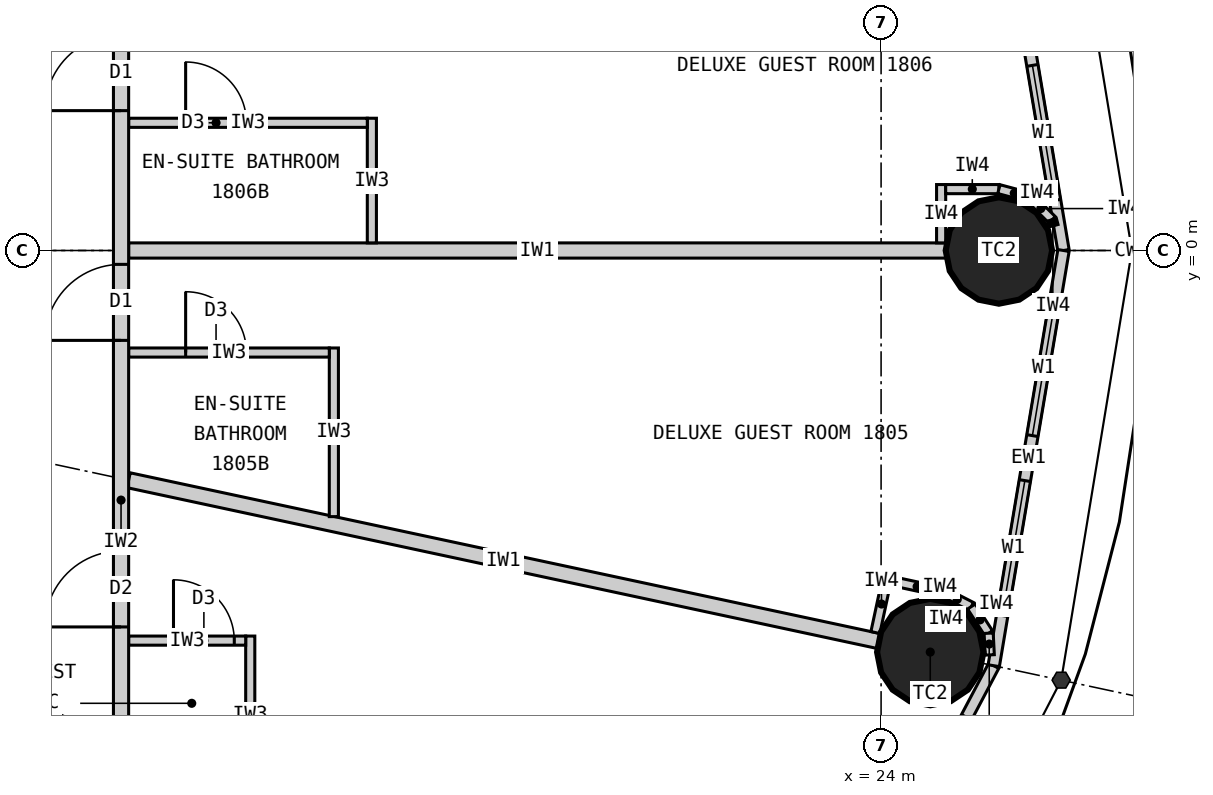
"""IFC4 building model, lengths in metres.
Left out: names, types, materials, properties, quantities, classifications, styles, units other than length and angle.
Written with IfcOpenShell. Run it as: python <this file> out.ifc"""

import sys

from ifc_helpers import new_model, si_unit, direction, frame, frame_2d, origin, origin_2d, place, context, subcontext, project, spatial, rectangle, circle, extrude, element, fill, save


model = new_model("IFC4")
c1 = context("Model", 3, precision=1e-05, world=origin(), true_north=direction((0.0, 1.0)))
c2 = subcontext(c1, "Body", "Model", "MODEL_VIEW")
j1 = project(units=[si_unit("LENGTHUNIT", "METRE"), si_unit("PLANEANGLEUNIT", "RADIAN")], contexts=[c1])
p1 = place(None, origin())
s1 = spatial("IfcSite", under=j1, at=p1, CompositionType="ELEMENT")
p2 = place(p1, origin())
s2 = spatial("IfcBuilding", under=s1, at=p2, CompositionType="ELEMENT")
p3 = place(p2, frame((0.0, 0.0, 73.8)))
s3 = spatial("IfcBuildingStorey", under=s2, at=p3, CompositionType="ELEMENT", Elevation=73.8)
for number, where, z_axis, x_axis in (
    (1, (25.55, 0.0, 0.0), (0.0, 0.0, 1.0), (1.0, 0.0, 0.0)),
    (2, (24.647, -5.283, 0.0), (0.0, 0.0, 1.0), (1.0, 0.0, 0.0)),
):
    element("IfcColumn", number, at=place(p3, frame(where, z_axis=z_axis, x_axis=x_axis)), inside=s3, PredefinedType="COLUMN", context=c2, shape_type="SweptSolid", body=[
        extrude(circle(Radius=0.7, at=origin_2d()), origin(), (0.0, 0.0, 1.0), 3.3),
    ])
p4 = place(p3, frame((26.4, 0.0, 0.0), z_axis=(0.0, 0.0, 1.0), x_axis=(-0.165642551694, 0.986185857264, 0.0)))
e3 = element("IfcWall", 3, at=p4, inside=s3, PredefinedType="ELEMENTEDWALL", context=c2, shape_type="SweptSolid", body=[
    extrude(rectangle(XDim=5.539, YDim=0.15, at=frame_2d((2.77, 0.0))), origin(), (0.0, 0.0, 1.0), 3.12),
])
p5 = place(p4, frame((0.669, 0.0, 0.9)))
e4 = element("IfcOpeningElement", 4, at=p5, cuts=e3, PredefinedType="OPENING", context=c2, shape_type="SweptSolid", body=[
    extrude(rectangle(XDim=1.8, YDim=1.9, at=frame_2d((0.9, 0.95))), frame((0.0, 0.085, 0.0), z_axis=(0.0, -1.0, 0.0), x_axis=(1.0, 0.0, 0.0)), (0.0, 0.0, 1.0), 0.17),
])
p6 = place(p4, frame((3.07, 0.0, 0.9)))
e5 = element("IfcOpeningElement", 5, at=p6, cuts=e3, PredefinedType="OPENING", context=c2, shape_type="SweptSolid", body=[
    extrude(rectangle(XDim=1.8, YDim=1.9, at=frame_2d((0.9, 0.95))), frame((0.0, 0.085, 0.0), z_axis=(0.0, -1.0, 0.0), x_axis=(1.0, 0.0, 0.0)), (0.0, 0.0, 1.0), 0.17),
])
p7 = place(p3, frame((22.803, -10.532, 0.0), z_axis=(0.0, 0.0, 1.0), x_axis=(0.467296867008, 0.884100468321, 0.0)))
e6 = element("IfcWall", 6, at=p7, inside=s3, PredefinedType="ELEMENTEDWALL", context=c2, shape_type="SweptSolid", body=[
    extrude(rectangle(XDim=5.734, YDim=0.15, at=frame_2d((2.867, 0.0))), origin(), (0.0, 0.0, 1.0), 3.12),
])
p8 = place(p7, frame((0.767, 0.0, 0.9)))
e7 = element("IfcOpeningElement", 7, at=p8, cuts=e6, PredefinedType="OPENING", context=c2, shape_type="SweptSolid", body=[
    extrude(rectangle(XDim=1.8, YDim=1.9, at=frame_2d((0.9, 0.95))), frame((0.0, 0.085, 0.0), z_axis=(0.0, -1.0, 0.0), x_axis=(1.0, 0.0, 0.0)), (0.0, 0.0, 1.0), 0.17),
])
p9 = place(p7, frame((3.167, 0.0, 0.9)))
e8 = element("IfcOpeningElement", 8, at=p9, cuts=e6, PredefinedType="OPENING", context=c2, shape_type="SweptSolid", body=[
    extrude(rectangle(XDim=1.8, YDim=1.9, at=frame_2d((0.9, 0.95))), frame((0.0, 0.085, 0.0), z_axis=(0.0, -1.0, 0.0), x_axis=(1.0, 0.0, 0.0)), (0.0, 0.0, 1.0), 0.17),
])
p10 = place(p3, frame((25.482, -5.462, 0.0), z_axis=(0.0, 0.0, 1.0), x_axis=(0.165642551694, 0.986185857264, 0.0)))
e9 = element("IfcWall", 9, at=p10, inside=s3, PredefinedType="ELEMENTEDWALL", context=c2, shape_type="SweptSolid", body=[
    extrude(rectangle(XDim=5.539, YDim=0.15, at=frame_2d((2.77, 0.0))), origin(), (0.0, 0.0, 1.0), 3.12),
])
p11 = place(p10, frame((0.669, 0.0, 0.9)))
e10 = element("IfcOpeningElement", 10, at=p11, cuts=e9, PredefinedType="OPENING", context=c2, shape_type="SweptSolid", body=[
    extrude(rectangle(XDim=1.8, YDim=1.9, at=frame_2d((0.9, 0.95))), frame((0.0, 0.085, 0.0), z_axis=(0.0, -1.0, 0.0), x_axis=(1.0, 0.0, 0.0)), (0.0, 0.0, 1.0), 0.17),
])
p12 = place(p10, frame((3.07, 0.0, 0.9)))
e11 = element("IfcOpeningElement", 11, at=p12, cuts=e9, PredefinedType="OPENING", context=c2, shape_type="SweptSolid", body=[
    extrude(rectangle(XDim=1.8, YDim=1.9, at=frame_2d((0.9, 0.95))), frame((0.0, 0.085, 0.0), z_axis=(0.0, -1.0, 0.0), x_axis=(1.0, 0.0, 0.0)), (0.0, 0.0, 1.0), 0.17),
])
p13 = place(p3, frame((14.1, 0.0, 0.0), z_axis=(0.0, 0.0, 1.0), x_axis=(1.0, 0.0, 0.0)))
e12 = element("IfcWall", 12, at=p13, inside=s3, PredefinedType="PARTITIONING", context=c2, shape_type="SweptSolid", body=[
    extrude(rectangle(XDim=10.75, YDim=0.2, at=frame_2d((5.375, 0.0))), origin(), (0.0, 0.0, 1.0), 2.27),
])
p14 = place(p3, frame((14.1, -3.022, 0.0), z_axis=(0.0, 0.0, 1.0), x_axis=(0.977790014929, -0.209586943072, 0.0)))
e13 = element("IfcWall", 13, at=p14, inside=s3, PredefinedType="PARTITIONING", context=c2, shape_type="SweptSolid", body=[
    extrude(rectangle(XDim=10.087, YDim=0.2, at=frame_2d((5.043, 0.0))), origin(), (0.0, 0.0, 1.0), 2.32),
])
p15 = place(p3, frame((15.7, -7.152, 0.0), z_axis=(0.0, 0.0, 1.0), x_axis=(0.0, 1.0, 0.0)))
e14 = element("IfcWall", 14, at=p15, inside=s3, PredefinedType="PARTITIONING", context=c2, shape_type="SweptSolid", body=[
    extrude(rectangle(XDim=2.079, YDim=0.12, at=frame_2d((1.04, 0.0))), origin(), (0.0, 0.0, 1.0), 3.12),
])
p16 = place(p3, frame((14.1, -5.133, 0.0), z_axis=(0.0, 0.0, 1.0), x_axis=(1.0, 0.0, 0.0)))
e15 = element("IfcWall", 15, at=p16, inside=s3, PredefinedType="PARTITIONING", context=c2, shape_type="SweptSolid", body=[
    extrude(rectangle(XDim=1.54, YDim=0.12, at=frame_2d((0.77, 0.0))), origin(), (0.0, 0.0, 1.0), 3.12),
])
p17 = place(p16, frame((0.59, 0.0, 0.0)))
e16 = element("IfcOpeningElement", 16, at=p17, cuts=e15, PredefinedType="OPENING", context=c2, shape_type="SweptSolid", body=[
    extrude(rectangle(XDim=0.8, YDim=2.1, at=frame_2d((0.4, 1.05))), frame((0.0, 0.07, 0.0), z_axis=(0.0, -1.0, 0.0), x_axis=(1.0, 0.0, 0.0)), (0.0, 0.0, 1.0), 0.14),
])
p18 = place(p3, frame((16.8, -3.501, 0.0), z_axis=(0.0, 0.0, 1.0), x_axis=(0.0, 1.0, 0.0)))
e17 = element("IfcWall", 17, at=p18, inside=s3, PredefinedType="PARTITIONING", context=c2, shape_type="SweptSolid", body=[
    extrude(rectangle(XDim=2.219, YDim=0.12, at=frame_2d((1.109, 0.0))), origin(), (0.0, 0.0, 1.0), 3.12),
])
p19 = place(p3, frame((14.1, -1.343, 0.0), z_axis=(0.0, 0.0, 1.0), x_axis=(1.0, 0.0, 0.0)))
e18 = element("IfcWall", 18, at=p19, inside=s3, PredefinedType="PARTITIONING", context=c2, shape_type="SweptSolid", body=[
    extrude(rectangle(XDim=2.64, YDim=0.12, at=frame_2d((1.32, 0.0))), origin(), (0.0, 0.0, 1.0), 3.12),
])
p20 = place(p19, frame((0.75, 0.0, 0.0)))
e19 = element("IfcOpeningElement", 19, at=p20, cuts=e18, PredefinedType="OPENING", context=c2, shape_type="SweptSolid", body=[
    extrude(rectangle(XDim=0.8, YDim=2.1, at=frame_2d((0.4, 1.05))), frame((0.0, 0.07, 0.0), z_axis=(0.0, -1.0, 0.0), x_axis=(1.0, 0.0, 0.0)), (0.0, 0.0, 1.0), 0.14),
])
p21 = place(p3, frame((17.3, 0.1, 0.0), z_axis=(0.0, 0.0, 1.0), x_axis=(0.0, 1.0, 0.0)))
e20 = element("IfcWall", 20, at=p21, inside=s3, PredefinedType="PARTITIONING", context=c2, shape_type="SweptSolid", body=[
    extrude(rectangle(XDim=1.64, YDim=0.12, at=frame_2d((0.82, 0.0))), origin(), (0.0, 0.0, 1.0), 3.12),
])
p22 = place(p3, frame((14.1, 1.68, 0.0), z_axis=(0.0, 0.0, 1.0), x_axis=(1.0, 0.0, 0.0)))
e21 = element("IfcWall", 21, at=p22, inside=s3, PredefinedType="PARTITIONING", context=c2, shape_type="SweptSolid", body=[
    extrude(rectangle(XDim=3.14, YDim=0.12, at=frame_2d((1.57, 0.0))), origin(), (0.0, 0.0, 1.0), 3.12),
])
p23 = place(p22, frame((0.75, 0.0, 0.0)))
e22 = element("IfcOpeningElement", 22, at=p23, cuts=e21, PredefinedType="OPENING", context=c2, shape_type="SweptSolid", body=[
    extrude(rectangle(XDim=0.8, YDim=2.1, at=frame_2d((0.4, 1.05))), frame((0.0, 0.07, 0.0), z_axis=(0.0, -1.0, 0.0), x_axis=(1.0, 0.0, 0.0)), (0.0, 0.0, 1.0), 0.14),
])
p24 = place(p3, frame((14.0, -9.9, 0.0), z_axis=(0.0, 0.0, 1.0), x_axis=(0.0, 1.0, 0.0)))
e23 = element("IfcWall", 23, at=p24, inside=s3, PredefinedType="PARTITIONING", context=c2, shape_type="SweptSolid", body=[
    extrude(rectangle(XDim=13.232, YDim=0.2, at=frame_2d((6.616, 0.0))), origin(), (0.0, 0.0, 1.0), 3.12),
])
p25 = place(p24, frame((4.948, 0.0, 0.0)))
e24 = element("IfcOpeningElement", 24, at=p25, cuts=e23, PredefinedType="OPENING", context=c2, shape_type="SweptSolid", body=[
    extrude(rectangle(XDim=1.0, YDim=2.2, at=frame_2d((0.5, 1.1))), frame((0.0, 0.11, 0.0), z_axis=(0.0, -1.0, 0.0), x_axis=(1.0, 0.0, 0.0)), (0.0, 0.0, 1.0), 0.22),
])
p26 = place(p24, frame((8.718, 0.0, 0.0)))
e25 = element("IfcOpeningElement", 25, at=p26, cuts=e23, PredefinedType="OPENING", context=c2, shape_type="SweptSolid", body=[
    extrude(rectangle(XDim=1.0, YDim=2.2, at=frame_2d((0.5, 1.1))), frame((0.0, 0.11, 0.0), z_axis=(0.0, -1.0, 0.0), x_axis=(1.0, 0.0, 0.0)), (0.0, 0.0, 1.0), 0.22),
])
p27 = place(p24, frame((11.74, 0.0, 0.0)))
e26 = element("IfcOpeningElement", 26, at=p27, cuts=e23, PredefinedType="OPENING", context=c2, shape_type="SweptSolid", body=[
    extrude(rectangle(XDim=1.0, YDim=2.2, at=frame_2d((0.5, 1.1))), frame((0.0, 0.11, 0.0), z_axis=(0.0, -1.0, 0.0), x_axis=(1.0, 0.0, 0.0)), (0.0, 0.0, 1.0), 0.22),
])
p28 = place(p3, frame((24.79, 0.1, 0.0), z_axis=(0.0, 0.0, 1.0), x_axis=(0.0, 1.0, 0.0)))
e27 = element("IfcWall", 27, at=p28, inside=s3, PredefinedType="PARTITIONING", context=c2, shape_type="SweptSolid", body=[
    extrude(rectangle(XDim=0.767, YDim=0.12, at=frame_2d((0.384, 0.0))), origin(), (0.0, 0.0, 1.0), 3.12),
])
p29 = place(p3, frame((24.85, 0.808, 0.0), z_axis=(0.0, 0.0, 1.0), x_axis=(1.0, 0.0, 0.0)))
e28 = element("IfcWall", 28, at=p29, inside=s3, PredefinedType="PARTITIONING", context=c2, shape_type="SweptSolid", body=[
    extrude(rectangle(XDim=0.7, YDim=0.12, at=frame_2d((0.35, 0.0))), origin(), (0.0, 0.0, 1.0), 3.12),
])
p30 = place(p3, frame((25.55, 0.808, 0.0), z_axis=(0.0, 0.0, 1.0), x_axis=(0.965807183573, -0.2592614205, 0.0)))
e29 = element("IfcWall", 29, at=p30, inside=s3, PredefinedType="PARTITIONING", context=c2, shape_type="SweptSolid", body=[
    extrude(rectangle(XDim=0.418, YDim=0.12, at=frame_2d((0.209, 0.0))), origin(), (0.0, 0.0, 1.0), 3.12),
])
p31 = place(p3, frame((25.954, 0.699, 0.0), z_axis=(0.0, 0.0, 1.0), x_axis=(0.707106781187, -0.707106781187, 0.0)))
e30 = element("IfcWall", 30, at=p31, inside=s3, PredefinedType="PARTITIONING", context=c2, shape_type="SweptSolid", body=[
    extrude(rectangle(XDim=0.418, YDim=0.12, at=frame_2d((0.209, 0.0))), origin(), (0.0, 0.0, 1.0), 3.12),
])
p32 = place(p3, frame((26.249, 0.404, 0.0), z_axis=(0.0, 0.0, 1.0), x_axis=(0.259754282609, -0.965674744759, 0.0)))
e31 = element("IfcWall", 31, at=p32, inside=s3, PredefinedType="PARTITIONING", context=c2, shape_type="SweptSolid", body=[
    extrude(rectangle(XDim=0.08, YDim=0.12, at=frame_2d((0.04, 0.0))), origin(), (0.0, 0.0, 1.0), 3.12),
])
p33 = place(p3, frame((23.925, -5.026, 0.0), z_axis=(0.0, 0.0, 1.0), x_axis=(0.209681192172, 0.977769808109, 0.0)))
e32 = element("IfcWall", 32, at=p33, inside=s3, PredefinedType="PARTITIONING", context=c2, shape_type="SweptSolid", body=[
    extrude(rectangle(XDim=0.767, YDim=0.12, at=frame_2d((0.384, 0.0))), origin(), (0.0, 0.0, 1.0), 3.12),
])
p34 = place(p3, frame((24.132, -4.347, 0.0), z_axis=(0.0, 0.0, 1.0), x_axis=(0.977776882509, -0.209648200638, 0.0)))
e33 = element("IfcWall", 33, at=p34, inside=s3, PredefinedType="PARTITIONING", context=c2, shape_type="SweptSolid", body=[
    extrude(rectangle(XDim=0.7, YDim=0.12, at=frame_2d((0.35, 0.0))), origin(), (0.0, 0.0, 1.0), 3.12),
])
for number, where, z_axis, x_axis in (
    (34, (24.816, -4.494, 0.0), (0.0, 0.0, 1.0), (0.89, -0.455, 0.0)),
    (35, (25.188, -4.684, 0.0), (0.0, 0.0, 1.0), (0.543, -0.84, 0.0)),
):
    element("IfcWall", number, at=place(p3, frame(where, z_axis=z_axis, x_axis=x_axis)), inside=s3, PredefinedType="PARTITIONING", context=c2, shape_type="SweptSolid", body=[
        extrude(rectangle(XDim=0.418, YDim=0.12, at=frame_2d((0.209, 0.0))), origin(), (0.0, 0.0, 1.0), 3.12),
    ])
p35 = place(p3, frame((25.416, -5.035, 0.0), z_axis=(0.0, 0.0, 1.0), x_axis=(0.050406329159, -0.998728793007, 0.0)))
e36 = element("IfcWall", 36, at=p35, inside=s3, PredefinedType="PARTITIONING", context=c2, shape_type="SweptSolid", body=[
    extrude(rectangle(XDim=0.286, YDim=0.12, at=frame_2d((0.143, 0.0))), origin(), (0.0, 0.0, 1.0), 3.12),
])
p36 = place(p5, origin())
e37 = element("IfcWindow", 37, at=p36, inside=s3, PartitioningType="SINGLE_PANEL", PredefinedType="WINDOW", context=c2, shape_type="SweptSolid", body=[
    extrude(rectangle(XDim=1.8, YDim=1.9, at=frame_2d((0.9, 0.95))), frame((0.0, 0.03, 0.0), z_axis=(0.0, -1.0, 0.0), x_axis=(1.0, 0.0, 0.0)), (0.0, 0.0, 1.0), 0.06),
])
fill(e4, e37)
p37 = place(p11, origin())
e38 = element("IfcWindow", 38, at=p37, inside=s3, PartitioningType="SINGLE_PANEL", PredefinedType="WINDOW", context=c2, shape_type="SweptSolid", body=[
    extrude(rectangle(XDim=1.8, YDim=1.9, at=frame_2d((0.9, 0.95))), frame((0.0, 0.03, 0.0), z_axis=(0.0, -1.0, 0.0), x_axis=(1.0, 0.0, 0.0)), (0.0, 0.0, 1.0), 0.06),
])
fill(e10, e38)
p38 = place(p12, origin())
e39 = element("IfcWindow", 39, at=p38, inside=s3, PartitioningType="SINGLE_PANEL", PredefinedType="WINDOW", context=c2, shape_type="SweptSolid", body=[
    extrude(rectangle(XDim=1.8, YDim=1.9, at=frame_2d((0.9, 0.95))), frame((0.0, 0.03, 0.0), z_axis=(0.0, -1.0, 0.0), x_axis=(1.0, 0.0, 0.0)), (0.0, 0.0, 1.0), 0.06),
])
fill(e11, e39)
p39 = place(p17, origin())
e40 = element("IfcDoor", 40, at=p39, inside=s3, OperationType="SINGLE_SWING_LEFT", PredefinedType="DOOR", context=c2, shape_type="SweptSolid", body=[
    extrude(rectangle(XDim=0.8, YDim=2.1, at=frame_2d((0.4, 1.05))), frame((0.0, 0.025, 0.0), z_axis=(0.0, -1.0, 0.0), x_axis=(1.0, 0.0, 0.0)), (0.0, 0.0, 1.0), 0.05),
])
fill(e16, e40)
p40 = place(p25, origin())
e41 = element("IfcDoor", 41, at=p40, inside=s3, OperationType="SINGLE_SWING_LEFT", PredefinedType="DOOR", context=c2, shape_type="SweptSolid", body=[
    extrude(rectangle(XDim=1.0, YDim=2.2, at=frame_2d((0.5, 1.1))), frame((0.0, 0.025, 0.0), z_axis=(0.0, -1.0, 0.0), x_axis=(1.0, 0.0, 0.0)), (0.0, 0.0, 1.0), 0.05),
])
fill(e24, e41)
p41 = place(p20, origin())
e42 = element("IfcDoor", 42, at=p41, inside=s3, OperationType="SINGLE_SWING_LEFT", PredefinedType="DOOR", context=c2, shape_type="SweptSolid", body=[
    extrude(rectangle(XDim=0.8, YDim=2.1, at=frame_2d((0.4, 1.05))), frame((0.0, 0.025, 0.0), z_axis=(0.0, -1.0, 0.0), x_axis=(1.0, 0.0, 0.0)), (0.0, 0.0, 1.0), 0.05),
])
fill(e19, e42)
p42 = place(p26, origin())
e43 = element("IfcDoor", 43, at=p42, inside=s3, OperationType="SINGLE_SWING_LEFT", PredefinedType="DOOR", context=c2, shape_type="SweptSolid", body=[
    extrude(rectangle(XDim=1.0, YDim=2.2, at=frame_2d((0.5, 1.1))), frame((0.0, 0.025, 0.0), z_axis=(0.0, -1.0, 0.0), x_axis=(1.0, 0.0, 0.0)), (0.0, 0.0, 1.0), 0.05),
])
fill(e25, e43)
p43 = place(p23, origin())
e44 = element("IfcDoor", 44, at=p43, inside=s3, OperationType="SINGLE_SWING_LEFT", PredefinedType="DOOR", context=c2, shape_type="SweptSolid", body=[
    extrude(rectangle(XDim=0.8, YDim=2.1, at=frame_2d((0.4, 1.05))), frame((0.0, 0.025, 0.0), z_axis=(0.0, -1.0, 0.0), x_axis=(1.0, 0.0, 0.0)), (0.0, 0.0, 1.0), 0.05),
])
fill(e22, e44)
p44 = place(p27, origin())
e45 = element("IfcDoor", 45, at=p44, inside=s3, OperationType="SINGLE_SWING_LEFT", PredefinedType="DOOR", context=c2, shape_type="SweptSolid", body=[
    extrude(rectangle(XDim=1.0, YDim=2.2, at=frame_2d((0.5, 1.1))), frame((0.0, 0.025, 0.0), z_axis=(0.0, -1.0, 0.0), x_axis=(1.0, 0.0, 0.0)), (0.0, 0.0, 1.0), 0.05),
])
fill(e26, e45)
save(model, sys.argv[1])
